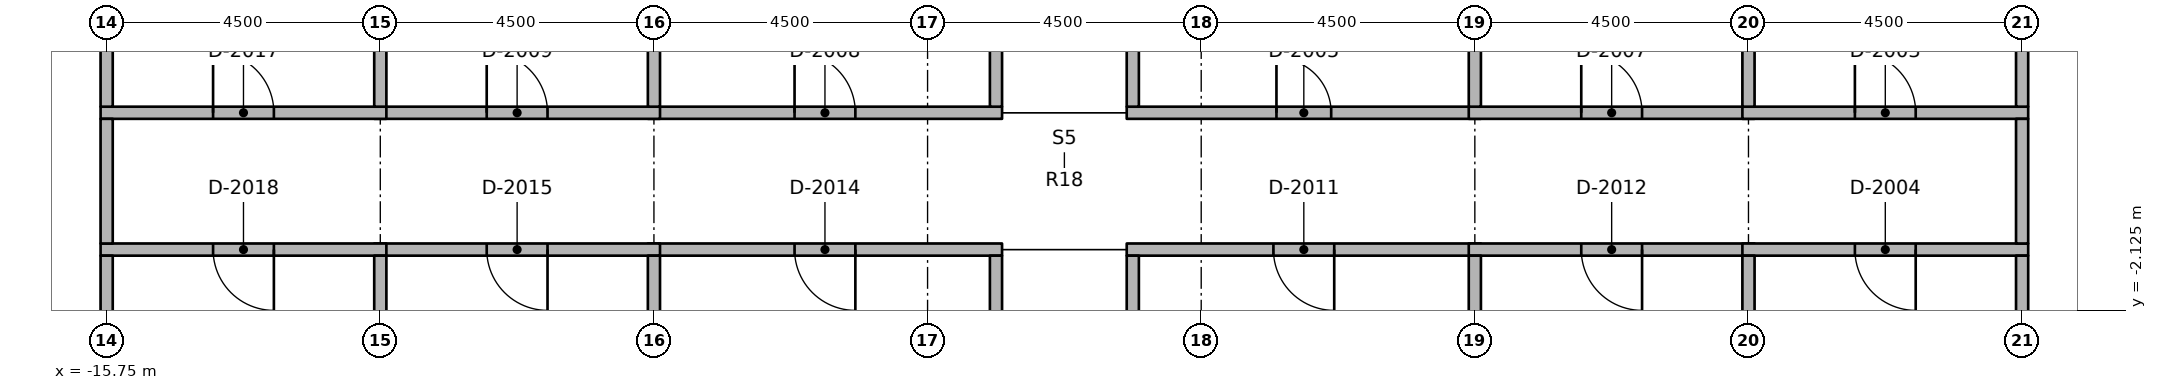
"""IFC4 building model, lengths in metres.
Left out: names, types, materials, properties, quantities, classifications, styles, units other than length and angle.
Written with IfcOpenShell. Run it as: python <this file> out.ifc"""

import sys

from ifc_helpers import new_model, si_unit, direction, frame, frame_2d, origin, place, context, subcontext, project, spatial, rectangle, extrude, element, fill, save


model = new_model("IFC4")
c1 = context("Model", 3, precision=1e-05, world=origin(), true_north=direction((0.0, 1.0)))
c2 = subcontext(c1, "Body", "Model", "MODEL_VIEW")
j1 = project(units=[si_unit("LENGTHUNIT", "METRE"), si_unit("PLANEANGLEUNIT", "RADIAN")], contexts=[c1])
p1 = place(None, origin())
s1 = spatial("IfcSite", under=j1, at=p1, CompositionType="ELEMENT")
p2 = place(p1, origin())
s2 = spatial("IfcBuilding", under=s1, at=p2, CompositionType="ELEMENT")
p3 = place(p2, frame((0.0, 0.0, 186.6)))
s3 = spatial("IfcBuildingStorey", under=s2, at=p3, CompositionType="ELEMENT", Elevation=186.6)
p4 = place(p3, frame((1.025, 1.125, 0.0), z_axis=(0.0, 0.0, 1.0), x_axis=(1.0, 0.0, 0.0)))
e1 = element("IfcWall", 1, at=p4, inside=s3, PredefinedType="PARTITIONING", context=c2, shape_type="SweptSolid", body=[
    extrude(rectangle(XDim=5.825, YDim=0.2, at=frame_2d((2.913, 0.0))), origin(), (0.0, 0.0, 1.0), 2.746),
])
p5 = place(p4, frame((2.462, 0.0, 0.0)))
e2 = element("IfcOpeningElement", 2, at=p5, cuts=e1, PredefinedType="OPENING", context=c2, shape_type="SweptSolid", body=[
    extrude(rectangle(XDim=0.9, YDim=2.1, at=frame_2d((0.45, 1.05))), frame((0.0, 0.11, 0.0), z_axis=(0.0, -1.0, 0.0), x_axis=(1.0, 0.0, 0.0)), (0.0, 0.0, 1.0), 0.22),
])
p6 = place(p3, frame((6.65, 1.125, 0.0), z_axis=(0.0, 0.0, 1.0), x_axis=(1.0, 0.0, 0.0)))
e3 = element("IfcWall", 3, at=p6, inside=s3, PredefinedType="PARTITIONING", context=c2, shape_type="SweptSolid", body=[
    extrude(rectangle(XDim=4.7, YDim=0.2, at=frame_2d((2.35, 0.0))), origin(), (0.0, 0.0, 1.0), 2.746),
])
p7 = place(p6, frame((1.85, 0.0, 0.0)))
e4 = element("IfcOpeningElement", 4, at=p7, cuts=e3, PredefinedType="OPENING", context=c2, shape_type="SweptSolid", body=[
    extrude(rectangle(XDim=1.0, YDim=2.1, at=frame_2d((0.5, 1.05))), frame((0.0, 0.11, 0.0), z_axis=(0.0, -1.0, 0.0), x_axis=(1.0, 0.0, 0.0)), (0.0, 0.0, 1.0), 0.22),
])
p8 = place(p3, frame((-6.85, 1.125, 0.0), z_axis=(0.0, 0.0, 1.0), x_axis=(1.0, 0.0, 0.0)))
e5 = element("IfcWall", 5, at=p8, inside=s3, PredefinedType="PARTITIONING", context=c2, shape_type="SweptSolid", body=[
    extrude(rectangle(XDim=5.825, YDim=0.2, at=frame_2d((2.913, 0.0))), origin(), (0.0, 0.0, 1.0), 2.746),
])
p9 = place(p8, frame((2.413, 0.0, 0.0)))
e6 = element("IfcOpeningElement", 6, at=p9, cuts=e5, PredefinedType="OPENING", context=c2, shape_type="SweptSolid", body=[
    extrude(rectangle(XDim=1.0, YDim=2.1, at=frame_2d((0.5, 1.05))), frame((0.0, 0.11, 0.0), z_axis=(0.0, -1.0, 0.0), x_axis=(1.0, 0.0, 0.0)), (0.0, 0.0, 1.0), 0.22),
])
p10 = place(p3, frame((-11.35, 1.125, 0.0), z_axis=(0.0, 0.0, 1.0), x_axis=(1.0, 0.0, 0.0)))
e7 = element("IfcWall", 7, at=p10, inside=s3, PredefinedType="PARTITIONING", context=c2, shape_type="SweptSolid", body=[
    extrude(rectangle(XDim=4.7, YDim=0.2, at=frame_2d((2.35, 0.0))), origin(), (0.0, 0.0, 1.0), 2.746),
])
p11 = place(p10, frame((1.85, 0.0, 0.0)))
e8 = element("IfcOpeningElement", 8, at=p11, cuts=e7, PredefinedType="OPENING", context=c2, shape_type="SweptSolid", body=[
    extrude(rectangle(XDim=1.0, YDim=2.1, at=frame_2d((0.5, 1.05))), frame((0.0, 0.11, 0.0), z_axis=(0.0, -1.0, 0.0), x_axis=(1.0, 0.0, 0.0)), (0.0, 0.0, 1.0), 0.22),
])
p12 = place(p3, frame((6.85, -1.125, 0.0), z_axis=(0.0, 0.0, 1.0), x_axis=(-1.0, 0.0, 0.0)))
e9 = element("IfcWall", 9, at=p12, inside=s3, PredefinedType="PARTITIONING", context=c2, shape_type="SweptSolid", body=[
    extrude(rectangle(XDim=5.825, YDim=0.2, at=frame_2d((2.913, 0.0))), origin(), (0.0, 0.0, 1.0), 2.746),
])
p13 = place(p12, frame((2.413, 0.0, 0.0)))
e10 = element("IfcOpeningElement", 10, at=p13, cuts=e9, PredefinedType="OPENING", context=c2, shape_type="SweptSolid", body=[
    extrude(rectangle(XDim=1.0, YDim=2.1, at=frame_2d((0.5, 1.05))), frame((0.0, 0.11, 0.0), z_axis=(0.0, -1.0, 0.0), x_axis=(1.0, 0.0, 0.0)), (0.0, 0.0, 1.0), 0.22),
])
p14 = place(p3, frame((11.35, -1.125, 0.0), z_axis=(0.0, 0.0, 1.0), x_axis=(-1.0, 0.0, 0.0)))
e11 = element("IfcWall", 11, at=p14, inside=s3, PredefinedType="PARTITIONING", context=c2, shape_type="SweptSolid", body=[
    extrude(rectangle(XDim=4.7, YDim=0.2, at=frame_2d((2.35, 0.0))), origin(), (0.0, 0.0, 1.0), 2.746),
])
p15 = place(p14, frame((1.85, 0.0, 0.0)))
e12 = element("IfcOpeningElement", 12, at=p15, cuts=e11, PredefinedType="OPENING", context=c2, shape_type="SweptSolid", body=[
    extrude(rectangle(XDim=1.0, YDim=2.1, at=frame_2d((0.5, 1.05))), frame((0.0, 0.11, 0.0), z_axis=(0.0, -1.0, 0.0), x_axis=(1.0, 0.0, 0.0)), (0.0, 0.0, 1.0), 0.22),
])
p16 = place(p3, frame((-1.025, -1.125, 0.0), z_axis=(0.0, 0.0, 1.0), x_axis=(-1.0, 0.0, 0.0)))
e13 = element("IfcWall", 13, at=p16, inside=s3, PredefinedType="PARTITIONING", context=c2, shape_type="SweptSolid", body=[
    extrude(rectangle(XDim=5.825, YDim=0.2, at=frame_2d((2.913, 0.0))), origin(), (0.0, 0.0, 1.0), 2.746),
])
p17 = place(p16, frame((2.413, 0.0, 0.0)))
e14 = element("IfcOpeningElement", 14, at=p17, cuts=e13, PredefinedType="OPENING", context=c2, shape_type="SweptSolid", body=[
    extrude(rectangle(XDim=1.0, YDim=2.1, at=frame_2d((0.5, 1.05))), frame((0.0, 0.11, 0.0), z_axis=(0.0, -1.0, 0.0), x_axis=(1.0, 0.0, 0.0)), (0.0, 0.0, 1.0), 0.22),
])
p18 = place(p3, frame((-6.65, -1.125, 0.0), z_axis=(0.0, 0.0, 1.0), x_axis=(-1.0, 0.0, 0.0)))
e15 = element("IfcWall", 15, at=p18, inside=s3, PredefinedType="PARTITIONING", context=c2, shape_type="SweptSolid", body=[
    extrude(rectangle(XDim=4.7, YDim=0.2, at=frame_2d((2.35, 0.0))), origin(), (0.0, 0.0, 1.0), 2.746),
])
p19 = place(p18, frame((1.85, 0.0, 0.0)))
e16 = element("IfcOpeningElement", 16, at=p19, cuts=e15, PredefinedType="OPENING", context=c2, shape_type="SweptSolid", body=[
    extrude(rectangle(XDim=1.0, YDim=2.1, at=frame_2d((0.5, 1.05))), frame((0.0, 0.11, 0.0), z_axis=(0.0, -1.0, 0.0), x_axis=(1.0, 0.0, 0.0)), (0.0, 0.0, 1.0), 0.22),
])
p20 = place(p3, frame((11.15, 1.125, 0.0), z_axis=(0.0, 0.0, 1.0), x_axis=(1.0, 0.0, 0.0)))
e17 = element("IfcWall", 17, at=p20, inside=s3, PredefinedType="PARTITIONING", context=c2, shape_type="SweptSolid", body=[
    extrude(rectangle(XDim=4.7, YDim=0.2, at=frame_2d((2.35, 0.0))), origin(), (0.0, 0.0, 1.0), 2.746),
])
p21 = place(p20, frame((1.85, 0.0, 0.0)))
e18 = element("IfcOpeningElement", 18, at=p21, cuts=e17, PredefinedType="OPENING", context=c2, shape_type="SweptSolid", body=[
    extrude(rectangle(XDim=1.0, YDim=2.1, at=frame_2d((0.5, 1.05))), frame((0.0, 0.11, 0.0), z_axis=(0.0, -1.0, 0.0), x_axis=(1.0, 0.0, 0.0)), (0.0, 0.0, 1.0), 0.22),
])
p22 = place(p3, frame((15.85, -1.125, 0.0), z_axis=(0.0, 0.0, 1.0), x_axis=(-1.0, 0.0, 0.0)))
e19 = element("IfcWall", 19, at=p22, inside=s3, PredefinedType="PARTITIONING", context=c2, shape_type="SweptSolid", body=[
    extrude(rectangle(XDim=4.7, YDim=0.2, at=frame_2d((2.35, 0.0))), origin(), (0.0, 0.0, 1.0), 2.746),
])
p23 = place(p22, frame((1.85, 0.0, 0.0)))
e20 = element("IfcOpeningElement", 20, at=p23, cuts=e19, PredefinedType="OPENING", context=c2, shape_type="SweptSolid", body=[
    extrude(rectangle(XDim=1.0, YDim=2.1, at=frame_2d((0.5, 1.05))), frame((0.0, 0.11, 0.0), z_axis=(0.0, -1.0, 0.0), x_axis=(1.0, 0.0, 0.0)), (0.0, 0.0, 1.0), 0.22),
])
p24 = place(p3, frame((15.75, -1.025, 0.0), z_axis=(0.0, 0.0, 1.0), x_axis=(0.0, 1.0, 0.0)))
e21 = element("IfcWall", 21, at=p24, inside=s3, PredefinedType="PARTITIONING", context=c2, shape_type="SweptSolid", body=[
    extrude(rectangle(XDim=2.05, YDim=0.2, at=frame_2d((1.025, 0.0))), origin(), (0.0, 0.0, 1.0), 2.746),
])
p25 = place(p3, frame((-15.85, 1.125, 0.0), z_axis=(0.0, 0.0, 1.0), x_axis=(1.0, 0.0, 0.0)))
e22 = element("IfcWall", 22, at=p25, inside=s3, PredefinedType="PARTITIONING", context=c2, shape_type="SweptSolid", body=[
    extrude(rectangle(XDim=4.7, YDim=0.2, at=frame_2d((2.35, 0.0))), origin(), (0.0, 0.0, 1.0), 2.746),
])
p26 = place(p25, frame((1.85, 0.0, 0.0)))
e23 = element("IfcOpeningElement", 23, at=p26, cuts=e22, PredefinedType="OPENING", context=c2, shape_type="SweptSolid", body=[
    extrude(rectangle(XDim=1.0, YDim=2.1, at=frame_2d((0.5, 1.05))), frame((0.0, 0.11, 0.0), z_axis=(0.0, -1.0, 0.0), x_axis=(1.0, 0.0, 0.0)), (0.0, 0.0, 1.0), 0.22),
])
p27 = place(p3, frame((-11.15, -1.125, 0.0), z_axis=(0.0, 0.0, 1.0), x_axis=(-1.0, 0.0, 0.0)))
e24 = element("IfcWall", 24, at=p27, inside=s3, PredefinedType="PARTITIONING", context=c2, shape_type="SweptSolid", body=[
    extrude(rectangle(XDim=4.7, YDim=0.2, at=frame_2d((2.35, 0.0))), origin(), (0.0, 0.0, 1.0), 2.746),
])
p28 = place(p27, frame((1.85, 0.0, 0.0)))
e25 = element("IfcOpeningElement", 25, at=p28, cuts=e24, PredefinedType="OPENING", context=c2, shape_type="SweptSolid", body=[
    extrude(rectangle(XDim=1.0, YDim=2.1, at=frame_2d((0.5, 1.05))), frame((0.0, 0.11, 0.0), z_axis=(0.0, -1.0, 0.0), x_axis=(1.0, 0.0, 0.0)), (0.0, 0.0, 1.0), 0.22),
])
p29 = place(p3, frame((-15.75, -1.025, 0.0), z_axis=(0.0, 0.0, 1.0), x_axis=(0.0, 1.0, 0.0)))
e26 = element("IfcWall", 26, at=p29, inside=s3, PredefinedType="PARTITIONING", context=c2, shape_type="SweptSolid", body=[
    extrude(rectangle(XDim=2.05, YDim=0.2, at=frame_2d((1.025, 0.0))), origin(), (0.0, 0.0, 1.0), 2.746),
])
p30 = place(p3, frame((1.125, 1.225, 0.0), z_axis=(0.0, 0.0, 1.0), x_axis=(0.0, 1.0, 0.0)))
e27 = element("IfcWall", 27, at=p30, inside=s3, PredefinedType="PARTITIONING", context=c2, shape_type="SweptSolid", body=[
    extrude(rectangle(XDim=2.675, YDim=0.2, at=frame_2d((1.337, 0.0))), origin(), (0.0, 0.0, 1.0), 2.746),
])
for number, where, z_axis, x_axis in (
    (28, (-1.125, 1.225, 0.0), (0.0, 0.0, 1.0), (0.0, 1.0, 0.0)),
    (29, (1.125, -6.65, 0.0), (0.0, 0.0, 1.0), (0.0, 1.0, 0.0)),
    (30, (-1.125, -6.65, 0.0), (0.0, 0.0, 1.0), (0.0, 1.0, 0.0)),
):
    element("IfcWall", number, at=place(p3, frame(where, z_axis=z_axis, x_axis=x_axis)), inside=s3, PredefinedType="PARTITIONING", context=c2, shape_type="SweptSolid", body=[
        extrude(rectangle(XDim=5.425, YDim=0.2, at=frame_2d((2.712, 0.0))), origin(), (0.0, 0.0, 1.0), 2.746),
    ])
p31 = place(p3, frame((6.75, 1.225, 0.0), z_axis=(0.0, 0.0, 1.0), x_axis=(0.0, 1.0, 0.0)))
e31 = element("IfcWall", 31, at=p31, inside=s3, PredefinedType="PARTITIONING", context=c2, shape_type="SweptSolid", body=[
    extrude(rectangle(XDim=2.675, YDim=0.2, at=frame_2d((1.337, 0.0))), origin(), (0.0, 0.0, 1.0), 2.746),
])
p32 = place(p3, frame((11.25, 1.225, 0.0), z_axis=(0.0, 0.0, 1.0), x_axis=(0.0, 1.0, 0.0)))
e32 = element("IfcWall", 32, at=p32, inside=s3, PredefinedType="PARTITIONING", context=c2, shape_type="SweptSolid", body=[
    extrude(rectangle(XDim=4.945, YDim=0.2, at=frame_2d((2.472, 0.0))), origin(), (0.0, 0.0, 1.0), 2.746),
])
for number, where, z_axis, x_axis in (
    (33, (-6.75, 1.225, 0.0), (0.0, 0.0, 1.0), (0.0, 1.0, 0.0)),
    (34, (-11.25, 1.225, 0.0), (0.0, 0.0, 1.0), (0.0, 1.0, 0.0)),
    (35, (6.75, -6.65, 0.0), (0.0, 0.0, 1.0), (0.0, 1.0, 0.0)),
    (36, (11.25, -6.65, 0.0), (0.0, 0.0, 1.0), (0.0, 1.0, 0.0)),
    (37, (-6.75, -6.65, 0.0), (0.0, 0.0, 1.0), (0.0, 1.0, 0.0)),
):
    element("IfcWall", number, at=place(p3, frame(where, z_axis=z_axis, x_axis=x_axis)), inside=s3, PredefinedType="PARTITIONING", context=c2, shape_type="SweptSolid", body=[
        extrude(rectangle(XDim=5.425, YDim=0.2, at=frame_2d((2.712, 0.0))), origin(), (0.0, 0.0, 1.0), 2.746),
    ])
p33 = place(p3, frame((-11.25, -6.17, 0.0), z_axis=(0.0, 0.0, 1.0), x_axis=(0.0, 1.0, 0.0)))
e38 = element("IfcWall", 38, at=p33, inside=s3, PredefinedType="PARTITIONING", context=c2, shape_type="SweptSolid", body=[
    extrude(rectangle(XDim=4.945, YDim=0.2, at=frame_2d((2.472, 0.0))), origin(), (0.0, 0.0, 1.0), 2.746),
])
p34 = place(p3, frame((15.75, 5.85, 0.0), z_axis=(0.0, 0.0, 1.0), x_axis=(0.0, -1.0, 0.0)))
e39 = element("IfcWall", 39, at=p34, inside=s3, PredefinedType="PARTITIONING", context=c2, shape_type="SweptSolid", body=[
    extrude(rectangle(XDim=4.625, YDim=0.2, at=frame_2d((2.312, 0.0))), origin(), (0.0, 0.0, 1.0), 2.746),
])
p35 = place(p34, frame((1.413, 0.0, 0.0)))
e40 = element("IfcOpeningElement", 40, at=p35, cuts=e39, PredefinedType="OPENING", context=c2, shape_type="SweptSolid", body=[
    extrude(rectangle(XDim=1.8, YDim=2.1, at=frame_2d((0.9, 1.05))), frame((0.0, 0.11, 0.0), z_axis=(0.0, -1.0, 0.0), x_axis=(1.0, 0.0, 0.0)), (0.0, 0.0, 1.0), 0.22),
])
p36 = place(p3, frame((15.75, -5.85, 0.0), z_axis=(0.0, 0.0, 1.0), x_axis=(0.0, 1.0, 0.0)))
e41 = element("IfcWall", 41, at=p36, inside=s3, PredefinedType="PARTITIONING", context=c2, shape_type="SweptSolid", body=[
    extrude(rectangle(XDim=4.625, YDim=0.2, at=frame_2d((2.312, 0.0))), origin(), (0.0, 0.0, 1.0), 2.746),
])
p37 = place(p3, frame((-15.75, 1.225, 0.0), z_axis=(0.0, 0.0, 1.0), x_axis=(0.0, 1.0, 0.0)))
e42 = element("IfcWall", 42, at=p37, inside=s3, PredefinedType="PARTITIONING", context=c2, shape_type="SweptSolid", body=[
    extrude(rectangle(XDim=4.625, YDim=0.2, at=frame_2d((2.312, 0.0))), origin(), (0.0, 0.0, 1.0), 2.746),
])
p38 = place(p37, frame((1.413, 0.0, 0.0)))
e43 = element("IfcOpeningElement", 43, at=p38, cuts=e42, PredefinedType="OPENING", context=c2, shape_type="SweptSolid", body=[
    extrude(rectangle(XDim=1.8, YDim=2.1, at=frame_2d((0.9, 1.05))), frame((0.0, 0.11, 0.0), z_axis=(0.0, -1.0, 0.0), x_axis=(1.0, 0.0, 0.0)), (0.0, 0.0, 1.0), 0.22),
])
p39 = place(p3, frame((-15.75, -5.85, 0.0), z_axis=(0.0, 0.0, 1.0), x_axis=(0.0, 1.0, 0.0)))
e44 = element("IfcWall", 44, at=p39, inside=s3, PredefinedType="PARTITIONING", context=c2, shape_type="SweptSolid", body=[
    extrude(rectangle(XDim=4.625, YDim=0.2, at=frame_2d((2.312, 0.0))), origin(), (0.0, 0.0, 1.0), 2.746),
])
p40 = place(p21, origin())
e45 = element("IfcDoor", 45, at=p40, inside=s3, OperationType="SINGLE_SWING_RIGHT", PredefinedType="DOOR", context=c2, shape_type="SweptSolid", body=[
    extrude(rectangle(XDim=1.0, YDim=2.1, at=frame_2d((0.5, 1.05))), frame((0.0, 0.025, 0.0), z_axis=(0.0, -1.0, 0.0), x_axis=(1.0, 0.0, 0.0)), (0.0, 0.0, 1.0), 0.05),
])
fill(e18, e45)
p41 = place(p23, origin())
e46 = element("IfcDoor", 46, at=p41, inside=s3, OperationType="SINGLE_SWING_RIGHT", PredefinedType="DOOR", context=c2, shape_type="SweptSolid", body=[
    extrude(rectangle(XDim=1.0, YDim=2.1, at=frame_2d((0.5, 1.05))), frame((0.0, 0.025, 0.0), z_axis=(0.0, -1.0, 0.0), x_axis=(1.0, 0.0, 0.0)), (0.0, 0.0, 1.0), 0.05),
])
fill(e20, e46)
p42 = place(p5, origin())
e47 = element("IfcDoor", 47, at=p42, inside=s3, OperationType="SINGLE_SWING_RIGHT", PredefinedType="DOOR", context=c2, shape_type="SweptSolid", body=[
    extrude(rectangle(XDim=0.9, YDim=2.1, at=frame_2d((0.45, 1.05))), frame((0.0, 0.025, 0.0), z_axis=(0.0, -1.0, 0.0), x_axis=(1.0, 0.0, 0.0)), (0.0, 0.0, 1.0), 0.05),
])
fill(e2, e47)
p43 = place(p7, origin())
e48 = element("IfcDoor", 48, at=p43, inside=s3, OperationType="SINGLE_SWING_RIGHT", PredefinedType="DOOR", context=c2, shape_type="SweptSolid", body=[
    extrude(rectangle(XDim=1.0, YDim=2.1, at=frame_2d((0.5, 1.05))), frame((0.0, 0.025, 0.0), z_axis=(0.0, -1.0, 0.0), x_axis=(1.0, 0.0, 0.0)), (0.0, 0.0, 1.0), 0.05),
])
fill(e4, e48)
p44 = place(p9, origin())
e49 = element("IfcDoor", 49, at=p44, inside=s3, OperationType="SINGLE_SWING_RIGHT", PredefinedType="DOOR", context=c2, shape_type="SweptSolid", body=[
    extrude(rectangle(XDim=1.0, YDim=2.1, at=frame_2d((0.5, 1.05))), frame((0.0, 0.025, 0.0), z_axis=(0.0, -1.0, 0.0), x_axis=(1.0, 0.0, 0.0)), (0.0, 0.0, 1.0), 0.05),
])
fill(e6, e49)
p45 = place(p11, origin())
e50 = element("IfcDoor", 50, at=p45, inside=s3, OperationType="SINGLE_SWING_RIGHT", PredefinedType="DOOR", context=c2, shape_type="SweptSolid", body=[
    extrude(rectangle(XDim=1.0, YDim=2.1, at=frame_2d((0.5, 1.05))), frame((0.0, 0.025, 0.0), z_axis=(0.0, -1.0, 0.0), x_axis=(1.0, 0.0, 0.0)), (0.0, 0.0, 1.0), 0.05),
])
fill(e8, e50)
p46 = place(p13, origin())
e51 = element("IfcDoor", 51, at=p46, inside=s3, OperationType="SINGLE_SWING_RIGHT", PredefinedType="DOOR", context=c2, shape_type="SweptSolid", body=[
    extrude(rectangle(XDim=1.0, YDim=2.1, at=frame_2d((0.5, 1.05))), frame((0.0, 0.025, 0.0), z_axis=(0.0, -1.0, 0.0), x_axis=(1.0, 0.0, 0.0)), (0.0, 0.0, 1.0), 0.05),
])
fill(e10, e51)
p47 = place(p15, origin())
e52 = element("IfcDoor", 52, at=p47, inside=s3, OperationType="SINGLE_SWING_RIGHT", PredefinedType="DOOR", context=c2, shape_type="SweptSolid", body=[
    extrude(rectangle(XDim=1.0, YDim=2.1, at=frame_2d((0.5, 1.05))), frame((0.0, 0.025, 0.0), z_axis=(0.0, -1.0, 0.0), x_axis=(1.0, 0.0, 0.0)), (0.0, 0.0, 1.0), 0.05),
])
fill(e12, e52)
p48 = place(p17, origin())
e53 = element("IfcDoor", 53, at=p48, inside=s3, OperationType="SINGLE_SWING_RIGHT", PredefinedType="DOOR", context=c2, shape_type="SweptSolid", body=[
    extrude(rectangle(XDim=1.0, YDim=2.1, at=frame_2d((0.5, 1.05))), frame((0.0, 0.025, 0.0), z_axis=(0.0, -1.0, 0.0), x_axis=(1.0, 0.0, 0.0)), (0.0, 0.0, 1.0), 0.05),
])
fill(e14, e53)
p49 = place(p19, origin())
e54 = element("IfcDoor", 54, at=p49, inside=s3, OperationType="SINGLE_SWING_RIGHT", PredefinedType="DOOR", context=c2, shape_type="SweptSolid", body=[
    extrude(rectangle(XDim=1.0, YDim=2.1, at=frame_2d((0.5, 1.05))), frame((0.0, 0.025, 0.0), z_axis=(0.0, -1.0, 0.0), x_axis=(1.0, 0.0, 0.0)), (0.0, 0.0, 1.0), 0.05),
])
fill(e16, e54)
p50 = place(p26, origin())
e55 = element("IfcDoor", 55, at=p50, inside=s3, OperationType="SINGLE_SWING_RIGHT", PredefinedType="DOOR", context=c2, shape_type="SweptSolid", body=[
    extrude(rectangle(XDim=1.0, YDim=2.1, at=frame_2d((0.5, 1.05))), frame((0.0, 0.025, 0.0), z_axis=(0.0, -1.0, 0.0), x_axis=(1.0, 0.0, 0.0)), (0.0, 0.0, 1.0), 0.05),
])
fill(e23, e55)
p51 = place(p28, origin())
e56 = element("IfcDoor", 56, at=p51, inside=s3, OperationType="SINGLE_SWING_RIGHT", PredefinedType="DOOR", context=c2, shape_type="SweptSolid", body=[
    extrude(rectangle(XDim=1.0, YDim=2.1, at=frame_2d((0.5, 1.05))), frame((0.0, 0.025, 0.0), z_axis=(0.0, -1.0, 0.0), x_axis=(1.0, 0.0, 0.0)), (0.0, 0.0, 1.0), 0.05),
])
fill(e25, e56)
save(model, sys.argv[1])
